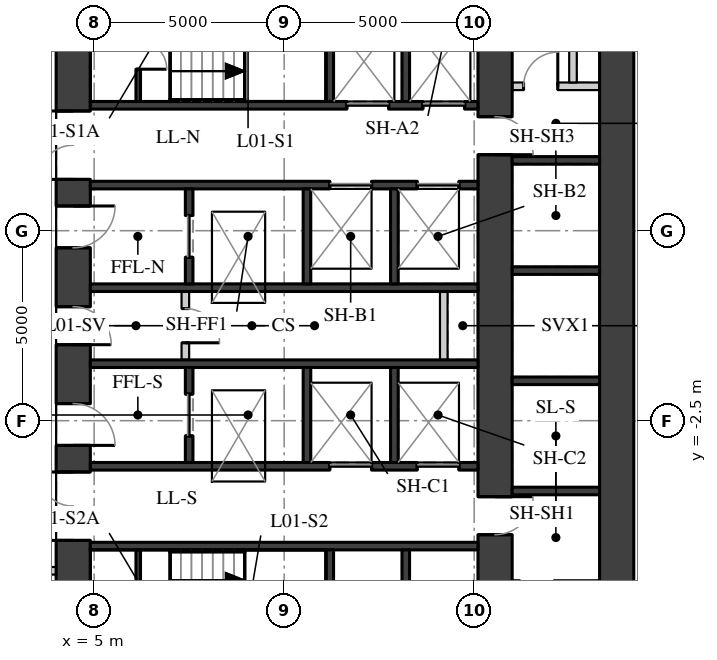
"""IFC4 building model, lengths in metres.
Left out: names, types, materials, properties, quantities, classifications, styles, units other than length and angle.
Written with IfcOpenShell. Run it as: python <this file> out.ifc"""

import sys

from ifc_helpers import new_model, si_unit, direction, frame, frame_2d, origin, place, context, subcontext, project, spatial, rectangle, extrude, element, fill, save


model = new_model("IFC4")
c1 = context("Model", 3, precision=1e-05, world=origin(), true_north=direction((0.0, 1.0)))
c2 = subcontext(c1, "Body", "Model", "MODEL_VIEW")
j1 = project(units=[si_unit("LENGTHUNIT", "METRE"), si_unit("PLANEANGLEUNIT", "RADIAN")], contexts=[c1])
p1 = place(None, origin())
s1 = spatial("IfcSite", under=j1, at=p1, CompositionType="ELEMENT")
p2 = place(p1, origin())
s2 = spatial("IfcBuilding", under=s1, at=p2, CompositionType="ELEMENT")
p3 = place(p2, frame((0.0, 0.0, 7.5)))
s3 = spatial("IfcBuildingStorey", under=s2, at=p3, CompositionType="ELEMENT", Elevation=7.5)
p4 = place(p3, frame((4.45, -11.1, 0.0), z_axis=(0.0, 0.0, 1.0), x_axis=(0.0, 1.0, 0.0)))
e1 = element("IfcWall", 1, at=p4, inside=s3, PredefinedType="SHEAR", context=c2, shape_type="SweptSolid", body=[
    extrude(rectangle(XDim=22.2, YDim=0.9, at=frame_2d((11.1, 0.0))), origin(), (0.0, 0.0, 1.0), 4.59),
])
p5 = place(p4, frame((2.35, 0.0, 0.0)))
e2 = element("IfcOpeningElement", 2, at=p5, cuts=e1, PredefinedType="OPENING", context=c2, shape_type="SweptSolid", body=[
    extrude(rectangle(XDim=1.5, YDim=2.1, at=frame_2d((0.75, 1.05))), frame((0.0, 0.46, 0.0), z_axis=(0.0, -1.0, 0.0), x_axis=(1.0, 0.0, 0.0)), (0.0, 0.0, 1.0), 0.92),
])
p6 = place(p4, frame((5.45, 0.0, 0.0)))
e3 = element("IfcOpeningElement", 3, at=p6, cuts=e1, PredefinedType="OPENING", context=c2, shape_type="SweptSolid", body=[
    extrude(rectangle(XDim=1.8, YDim=2.1, at=frame_2d((0.9, 1.05))), frame((0.0, 0.46, 0.0), z_axis=(0.0, -1.0, 0.0), x_axis=(1.0, 0.0, 0.0)), (0.0, 0.0, 1.0), 0.92),
])
p7 = place(p4, frame((7.95, 0.0, 0.0)))
e4 = element("IfcOpeningElement", 4, at=p7, cuts=e1, PredefinedType="OPENING", context=c2, shape_type="SweptSolid", body=[
    extrude(rectangle(XDim=1.1, YDim=2.1, at=frame_2d((0.55, 1.05))), frame((0.0, 0.46, 0.0), z_axis=(0.0, -1.0, 0.0), x_axis=(1.0, 0.0, 0.0)), (0.0, 0.0, 1.0), 0.92),
])
p8 = place(p4, frame((10.6, 0.0, 0.0)))
e5 = element("IfcOpeningElement", 5, at=p8, cuts=e1, PredefinedType="OPENING", context=c2, shape_type="SweptSolid", body=[
    extrude(rectangle(XDim=1.0, YDim=2.1, at=frame_2d((0.5, 1.05))), frame((0.0, 0.46, 0.0), z_axis=(0.0, -1.0, 0.0), x_axis=(1.0, 0.0, 0.0)), (0.0, 0.0, 1.0), 0.92),
])
p9 = place(p4, frame((13.15, 0.0, 0.0)))
e6 = element("IfcOpeningElement", 6, at=p9, cuts=e1, PredefinedType="OPENING", context=c2, shape_type="SweptSolid", body=[
    extrude(rectangle(XDim=1.1, YDim=2.1, at=frame_2d((0.55, 1.05))), frame((0.0, 0.46, 0.0), z_axis=(0.0, -1.0, 0.0), x_axis=(1.0, 0.0, 0.0)), (0.0, 0.0, 1.0), 0.92),
])
p10 = place(p4, frame((14.95, 0.0, 0.0)))
e7 = element("IfcOpeningElement", 7, at=p10, cuts=e1, PredefinedType="OPENING", context=c2, shape_type="SweptSolid", body=[
    extrude(rectangle(XDim=1.8, YDim=2.1, at=frame_2d((0.9, 1.05))), frame((0.0, 0.46, 0.0), z_axis=(0.0, -1.0, 0.0), x_axis=(1.0, 0.0, 0.0)), (0.0, 0.0, 1.0), 0.92),
])
p11 = place(p4, frame((18.35, 0.0, 0.0)))
e8 = element("IfcOpeningElement", 8, at=p11, cuts=e1, PredefinedType="OPENING", context=c2, shape_type="SweptSolid", body=[
    extrude(rectangle(XDim=1.5, YDim=2.1, at=frame_2d((0.75, 1.05))), frame((0.0, 0.46, 0.0), z_axis=(0.0, -1.0, 0.0), x_axis=(1.0, 0.0, 0.0)), (0.0, 0.0, 1.0), 0.92),
])
p12 = place(p3, frame((18.75, -11.1, 0.0), z_axis=(0.0, 0.0, 1.0), x_axis=(0.0, 1.0, 0.0)))
e9 = element("IfcWall", 9, at=p12, inside=s3, PredefinedType="SHEAR", context=c2, shape_type="SweptSolid", body=[
    extrude(rectangle(XDim=22.2, YDim=0.9, at=frame_2d((11.1, 0.0))), origin(), (0.0, 0.0, 1.0), 4.59),
])
p13 = place(p3, frame((15.55, -11.1, 0.0), z_axis=(0.0, 0.0, 1.0), x_axis=(0.0, 1.0, 0.0)))
e10 = element("IfcWall", 10, at=p13, inside=s3, PredefinedType="SHEAR", context=c2, shape_type="SweptSolid", body=[
    extrude(rectangle(XDim=22.2, YDim=0.9, at=frame_2d((11.1, 0.0))), origin(), (0.0, 0.0, 1.0), 4.59),
])
p14 = place(p13, frame((15.6, 0.0, 0.0)))
e11 = element("IfcOpeningElement", 11, at=p14, cuts=e10, PredefinedType="OPENING", context=c2, shape_type="SweptSolid", body=[
    extrude(rectangle(XDim=1.0, YDim=2.1, at=frame_2d((0.5, 1.05))), frame((0.0, 0.46, 0.0), z_axis=(0.0, -1.0, 0.0), x_axis=(1.0, 0.0, 0.0)), (0.0, 0.0, 1.0), 0.92),
])
p15 = place(p13, frame((5.6, 0.0, 0.0)))
e12 = element("IfcOpeningElement", 12, at=p15, cuts=e10, PredefinedType="OPENING", context=c2, shape_type="SweptSolid", body=[
    extrude(rectangle(XDim=1.0, YDim=2.1, at=frame_2d((0.5, 1.05))), frame((0.0, 0.46, 0.0), z_axis=(0.0, -1.0, 0.0), x_axis=(1.0, 0.0, 0.0)), (0.0, 0.0, 1.0), 0.92),
])
p16 = place(p3, frame((4.9, 5.8, 0.0), z_axis=(0.0, 0.0, 1.0), x_axis=(1.0, 0.0, 0.0)))
e13 = element("IfcWall", 13, at=p16, inside=s3, PredefinedType="SHEAR", context=c2, shape_type="SweptSolid", body=[
    extrude(rectangle(XDim=10.2, YDim=0.2, at=frame_2d((5.1, 0.0))), origin(), (0.0, 0.0, 1.0), 4.59),
])
p17 = place(p16, frame((6.75, 0.0, 0.0)))
e14 = element("IfcOpeningElement", 14, at=p17, cuts=e13, PredefinedType="OPENING", context=c2, shape_type="SweptSolid", body=[
    extrude(rectangle(XDim=1.1, YDim=2.1, at=frame_2d((0.55, 1.05))), frame((0.0, 0.11, 0.0), z_axis=(0.0, -1.0, 0.0), x_axis=(1.0, 0.0, 0.0)), (0.0, 0.0, 1.0), 0.22),
])
p18 = place(p16, frame((8.75, 0.0, 0.0)))
e15 = element("IfcOpeningElement", 15, at=p18, cuts=e13, PredefinedType="OPENING", context=c2, shape_type="SweptSolid", body=[
    extrude(rectangle(XDim=1.1, YDim=2.1, at=frame_2d((0.55, 1.05))), frame((0.0, 0.11, 0.0), z_axis=(0.0, -1.0, 0.0), x_axis=(1.0, 0.0, 0.0)), (0.0, 0.0, 1.0), 0.22),
])
p19 = place(p3, frame((4.9, 3.7, 0.0), z_axis=(0.0, 0.0, 1.0), x_axis=(1.0, 0.0, 0.0)))
e16 = element("IfcWall", 16, at=p19, inside=s3, PredefinedType="SHEAR", context=c2, shape_type="SweptSolid", body=[
    extrude(rectangle(XDim=10.2, YDim=0.2, at=frame_2d((5.1, 0.0))), origin(), (0.0, 0.0, 1.0), 4.59),
])
p20 = place(p19, frame((6.3, 0.0, 0.0)))
e17 = element("IfcOpeningElement", 17, at=p20, cuts=e16, PredefinedType="OPENING", context=c2, shape_type="SweptSolid", body=[
    extrude(rectangle(XDim=1.1, YDim=2.1, at=frame_2d((0.55, 1.05))), frame((0.0, 0.11, 0.0), z_axis=(0.0, -1.0, 0.0), x_axis=(1.0, 0.0, 0.0)), (0.0, 0.0, 1.0), 0.22),
])
p21 = place(p19, frame((8.6, 0.0, 0.0)))
e18 = element("IfcOpeningElement", 18, at=p21, cuts=e16, PredefinedType="OPENING", context=c2, shape_type="SweptSolid", body=[
    extrude(rectangle(XDim=1.1, YDim=2.1, at=frame_2d((0.55, 1.05))), frame((0.0, 0.11, 0.0), z_axis=(0.0, -1.0, 0.0), x_axis=(1.0, 0.0, 0.0)), (0.0, 0.0, 1.0), 0.22),
])
for number, where, z_axis, x_axis in (
    (19, (4.9, 1.0, 0.0), (0.0, 0.0, 1.0), (1.0, 0.0, 0.0)),
    (20, (4.9, -1.0, 0.0), (0.0, 0.0, 1.0), (1.0, 0.0, 0.0)),
):
    element("IfcWall", number, at=place(p3, frame(where, z_axis=z_axis, x_axis=x_axis)), inside=s3, PredefinedType="SHEAR", context=c2, shape_type="SweptSolid", body=[
        extrude(rectangle(XDim=10.2, YDim=0.2, at=frame_2d((5.1, 0.0))), origin(), (0.0, 0.0, 1.0), 4.59),
    ])
p22 = place(p3, frame((4.9, -3.7, 0.0), z_axis=(0.0, 0.0, 1.0), x_axis=(1.0, 0.0, 0.0)))
e21 = element("IfcWall", 21, at=p22, inside=s3, PredefinedType="SHEAR", context=c2, shape_type="SweptSolid", body=[
    extrude(rectangle(XDim=10.2, YDim=0.2, at=frame_2d((5.1, 0.0))), origin(), (0.0, 0.0, 1.0), 4.59),
])
p23 = place(p22, frame((6.3, 0.0, 0.0)))
e22 = element("IfcOpeningElement", 22, at=p23, cuts=e21, PredefinedType="OPENING", context=c2, shape_type="SweptSolid", body=[
    extrude(rectangle(XDim=1.1, YDim=2.1, at=frame_2d((0.55, 1.05))), frame((0.0, 0.11, 0.0), z_axis=(0.0, -1.0, 0.0), x_axis=(1.0, 0.0, 0.0)), (0.0, 0.0, 1.0), 0.22),
])
p24 = place(p22, frame((8.6, 0.0, 0.0)))
e23 = element("IfcOpeningElement", 23, at=p24, cuts=e21, PredefinedType="OPENING", context=c2, shape_type="SweptSolid", body=[
    extrude(rectangle(XDim=1.1, YDim=2.1, at=frame_2d((0.55, 1.05))), frame((0.0, 0.11, 0.0), z_axis=(0.0, -1.0, 0.0), x_axis=(1.0, 0.0, 0.0)), (0.0, 0.0, 1.0), 0.22),
])
p25 = place(p3, frame((4.9, -5.8, 0.0), z_axis=(0.0, 0.0, 1.0), x_axis=(1.0, 0.0, 0.0)))
e24 = element("IfcWall", 24, at=p25, inside=s3, PredefinedType="SHEAR", context=c2, shape_type="SweptSolid", body=[
    extrude(rectangle(XDim=10.2, YDim=0.2, at=frame_2d((5.1, 0.0))), origin(), (0.0, 0.0, 1.0), 4.59),
])
for number, where, z_axis, x_axis in (
    (25, (11.2, 5.9, 0.0), (0.0, 0.0, 1.0), (0.0, 1.0, 0.0)),
    (26, (11.2, -9.1, 0.0), (0.0, 0.0, 1.0), (0.0, 1.0, 0.0)),
    (27, (13.2, 5.9, 0.0), (0.0, 0.0, 1.0), (0.0, 1.0, 0.0)),
    (28, (13.2, -9.1, 0.0), (0.0, 0.0, 1.0), (0.0, 1.0, 0.0)),
):
    element("IfcWall", number, at=place(p3, frame(where, z_axis=z_axis, x_axis=x_axis)), inside=s3, PredefinedType="SHEAR", context=c2, shape_type="SweptSolid", body=[
        extrude(rectangle(XDim=3.2, YDim=0.2, at=frame_2d((1.6, 0.0))), origin(), (0.0, 0.0, 1.0), 4.59),
    ])
p26 = place(p3, frame((7.5, 1.1, 0.0), z_axis=(0.0, 0.0, 1.0), x_axis=(0.0, 1.0, 0.0)))
e29 = element("IfcWall", 29, at=p26, inside=s3, PredefinedType="SHEAR", context=c2, shape_type="SweptSolid", body=[
    extrude(rectangle(XDim=2.5, YDim=0.2, at=frame_2d((1.25, 0.0))), origin(), (0.0, 0.0, 1.0), 4.59),
])
p27 = place(p26, frame((0.7, 0.0, 0.0)))
e30 = element("IfcOpeningElement", 30, at=p27, cuts=e29, PredefinedType="OPENING", context=c2, shape_type="SweptSolid", body=[
    extrude(rectangle(XDim=1.1, YDim=2.1, at=frame_2d((0.55, 1.05))), frame((0.0, 0.11, 0.0), z_axis=(0.0, -1.0, 0.0), x_axis=(1.0, 0.0, 0.0)), (0.0, 0.0, 1.0), 0.22),
])
p28 = place(p3, frame((7.5, -3.6, 0.0), z_axis=(0.0, 0.0, 1.0), x_axis=(0.0, 1.0, 0.0)))
e31 = element("IfcWall", 31, at=p28, inside=s3, PredefinedType="SHEAR", context=c2, shape_type="SweptSolid", body=[
    extrude(rectangle(XDim=2.5, YDim=0.2, at=frame_2d((1.25, 0.0))), origin(), (0.0, 0.0, 1.0), 4.59),
])
p29 = place(p28, frame((0.7, 0.0, 0.0)))
e32 = element("IfcOpeningElement", 32, at=p29, cuts=e31, PredefinedType="OPENING", context=c2, shape_type="SweptSolid", body=[
    extrude(rectangle(XDim=1.1, YDim=2.1, at=frame_2d((0.55, 1.05))), frame((0.0, 0.11, 0.0), z_axis=(0.0, -1.0, 0.0), x_axis=(1.0, 0.0, 0.0)), (0.0, 0.0, 1.0), 0.22),
])
for number, where, z_axis, x_axis in (
    (33, (10.6, 1.1, 0.0), (0.0, 0.0, 1.0), (0.0, 1.0, 0.0)),
    (34, (10.6, -3.6, 0.0), (0.0, 0.0, 1.0), (0.0, 1.0, 0.0)),
    (35, (12.9, 1.1, 0.0), (0.0, 0.0, 1.0), (0.0, 1.0, 0.0)),
    (36, (12.9, -3.6, 0.0), (0.0, 0.0, 1.0), (0.0, 1.0, 0.0)),
):
    element("IfcWall", number, at=place(p3, frame(where, z_axis=z_axis, x_axis=x_axis)), inside=s3, PredefinedType="SHEAR", context=c2, shape_type="SweptSolid", body=[
        extrude(rectangle(XDim=2.5, YDim=0.2, at=frame_2d((1.25, 0.0))), origin(), (0.0, 0.0, 1.0), 4.59),
    ])
p30 = place(p3, frame((6.16, 5.9, 0.0), z_axis=(0.0, 0.0, 1.0), x_axis=(0.0, 1.0, 0.0)))
e37 = element("IfcWall", 37, at=p30, inside=s3, PredefinedType="SHEAR", context=c2, shape_type="SweptSolid", body=[
    extrude(rectangle(XDim=3.2, YDim=0.12, at=frame_2d((1.6, 0.0))), origin(), (0.0, 0.0, 1.0), 2.29),
])
p31 = place(p30, frame((0.85, 0.0, 0.0)))
e38 = element("IfcOpeningElement", 38, at=p31, cuts=e37, PredefinedType="OPENING", context=c2, shape_type="SweptSolid", body=[
    extrude(rectangle(XDim=1.5, YDim=2.1, at=frame_2d((0.75, 1.05))), frame((0.0, 0.07, 0.0), z_axis=(0.0, -1.0, 0.0), x_axis=(1.0, 0.0, 0.0)), (0.0, 0.0, 1.0), 0.14),
])
p32 = place(p3, frame((6.16, -9.1, 0.0), z_axis=(0.0, 0.0, 1.0), x_axis=(0.0, 1.0, 0.0)))
e39 = element("IfcWall", 39, at=p32, inside=s3, PredefinedType="SHEAR", context=c2, shape_type="SweptSolid", body=[
    extrude(rectangle(XDim=3.2, YDim=0.12, at=frame_2d((1.6, 0.0))), origin(), (0.0, 0.0, 1.0), 2.29),
])
p33 = place(p32, frame((0.85, 0.0, 0.0)))
e40 = element("IfcOpeningElement", 40, at=p33, cuts=e39, PredefinedType="OPENING", context=c2, shape_type="SweptSolid", body=[
    extrude(rectangle(XDim=1.5, YDim=2.1, at=frame_2d((0.75, 1.05))), frame((0.0, 0.07, 0.0), z_axis=(0.0, -1.0, 0.0), x_axis=(1.0, 0.0, 0.0)), (0.0, 0.0, 1.0), 0.14),
])
p34 = place(p3, frame((7.4, -0.9, 0.0), z_axis=(0.0, 0.0, 1.0), x_axis=(0.0, 1.0, 0.0)))
e41 = element("IfcWall", 41, at=p34, inside=s3, PredefinedType="PARTITIONING", context=c2, shape_type="SweptSolid", body=[
    extrude(rectangle(XDim=1.8, YDim=0.2, at=frame_2d((0.9, 0.0))), origin(), (0.0, 0.0, 1.0), 4.59),
])
p35 = place(p34, frame((0.45, 0.0, 0.0)))
e42 = element("IfcOpeningElement", 42, at=p35, cuts=e41, PredefinedType="OPENING", context=c2, shape_type="SweptSolid", body=[
    extrude(rectangle(XDim=0.9, YDim=2.1, at=frame_2d((0.45, 1.05))), frame((0.0, 0.11, 0.0), z_axis=(0.0, -1.0, 0.0), x_axis=(1.0, 0.0, 0.0)), (0.0, 0.0, 1.0), 0.22),
])
p36 = place(p3, frame((14.2, -0.9, 0.0), z_axis=(0.0, 0.0, 1.0), x_axis=(0.0, 1.0, 0.0)))
e43 = element("IfcWall", 43, at=p36, inside=s3, PredefinedType="PARTITIONING", context=c2, shape_type="SweptSolid", body=[
    extrude(rectangle(XDim=1.8, YDim=0.2, at=frame_2d((0.9, 0.0))), origin(), (0.0, 0.0, 1.0), 4.59),
])
for number, where, z_axis, x_axis in (
    (44, (16.0, -4.35, 0.0), (0.0, 0.0, 1.0), (1.0, 0.0, 0.0)),
    (45, (16.0, -1.45, 0.0), (0.0, 0.0, 1.0), (1.0, 0.0, 0.0)),
    (46, (16.0, 1.45, 0.0), (0.0, 0.0, 1.0), (1.0, 0.0, 0.0)),
    (47, (16.0, 4.35, 0.0), (0.0, 0.0, 1.0), (1.0, 0.0, 0.0)),
):
    element("IfcWall", number, at=place(p3, frame(where, z_axis=z_axis, x_axis=x_axis)), inside=s3, PredefinedType="SHEAR", context=c2, shape_type="SweptSolid", body=[
        extrude(rectangle(XDim=2.3, YDim=0.2, at=frame_2d((1.15, 0.0))), origin(), (0.0, 0.0, 1.0), 4.59),
    ])
p37 = place(p3, frame((16.0, 6.3, 0.0), z_axis=(0.0, 0.0, 1.0), x_axis=(1.0, 0.0, 0.0)))
e48 = element("IfcWall", 48, at=p37, inside=s3, PredefinedType="PARTITIONING", context=c2, shape_type="SweptSolid", body=[
    extrude(rectangle(XDim=2.3, YDim=0.2, at=frame_2d((1.15, 0.0))), origin(), (0.0, 0.0, 1.0), 4.59),
])
p38 = place(p37, frame((0.3, 0.0, 0.0)))
e49 = element("IfcOpeningElement", 49, at=p38, cuts=e48, PredefinedType="OPENING", context=c2, shape_type="SweptSolid", body=[
    extrude(rectangle(XDim=0.9, YDim=2.1, at=frame_2d((0.45, 1.05))), frame((0.0, 0.11, 0.0), z_axis=(0.0, -1.0, 0.0), x_axis=(1.0, 0.0, 0.0)), (0.0, 0.0, 1.0), 0.22),
])
p39 = place(p3, frame((17.6, 6.4, 0.0), z_axis=(0.0, 0.0, 1.0), x_axis=(0.0, 1.0, 0.0)))
e50 = element("IfcWall", 50, at=p39, inside=s3, PredefinedType="PARTITIONING", context=c2, shape_type="SweptSolid", body=[
    extrude(rectangle(XDim=4.7, YDim=0.2, at=frame_2d((2.35, 0.0))), origin(), (0.0, 0.0, 1.0), 4.59),
])
p40 = place(p3, frame((-14.4, -6.45, 0.0), z_axis=(0.0, 0.0, 1.0), x_axis=(1.0, 0.0, 0.0)))
e51 = element("IfcWall", 51, at=p40, inside=s3, PredefinedType="PARTITIONING", context=c2, shape_type="SweptSolid", body=[
    extrude(rectangle(XDim=18.402, YDim=0.2, at=frame_2d((9.201, 0.0))), origin(), (0.0, 0.0, 1.0), 4.59),
])
p41 = place(p40, frame((8.001, 0.0, 0.0)))
e52 = element("IfcOpeningElement", 52, at=p41, cuts=e51, PredefinedType="OPENING", context=c2, shape_type="SweptSolid", body=[
    extrude(rectangle(XDim=2.4, YDim=2.4, at=frame_2d((1.2, 1.2))), frame((0.0, 0.11, 0.0), z_axis=(0.0, -1.0, 0.0), x_axis=(1.0, 0.0, 0.0)), (0.0, 0.0, 1.0), 0.22),
])
p42 = place(p6, origin())
e53 = element("IfcDoor", 53, at=p42, inside=s3, OperationType="DOUBLE_DOOR_SINGLE_SWING", PredefinedType="DOOR", context=c2, shape_type="SweptSolid", body=[
    extrude(rectangle(XDim=1.8, YDim=2.1, at=frame_2d((0.9, 1.05))), frame((0.0, 0.025, 0.0), z_axis=(0.0, -1.0, 0.0), x_axis=(1.0, 0.0, 0.0)), (0.0, 0.0, 1.0), 0.05),
])
fill(e3, e53)
p43 = place(p7, origin())
e54 = element("IfcDoor", 54, at=p43, inside=s3, OperationType="SINGLE_SWING_RIGHT", PredefinedType="DOOR", context=c2, shape_type="SweptSolid", body=[
    extrude(rectangle(XDim=1.1, YDim=2.1, at=frame_2d((0.55, 1.05))), frame((0.0, 0.025, 0.0), z_axis=(0.0, -1.0, 0.0), x_axis=(1.0, 0.0, 0.0)), (0.0, 0.0, 1.0), 0.05),
])
fill(e4, e54)
p44 = place(p8, origin())
e55 = element("IfcDoor", 55, at=p44, inside=s3, OperationType="SINGLE_SWING_RIGHT", PredefinedType="DOOR", context=c2, shape_type="SweptSolid", body=[
    extrude(rectangle(XDim=1.0, YDim=2.1, at=frame_2d((0.5, 1.05))), frame((0.0, 0.025, 0.0), z_axis=(0.0, -1.0, 0.0), x_axis=(1.0, 0.0, 0.0)), (0.0, 0.0, 1.0), 0.05),
])
fill(e5, e55)
p45 = place(p9, origin())
e56 = element("IfcDoor", 56, at=p45, inside=s3, OperationType="SINGLE_SWING_LEFT", PredefinedType="DOOR", context=c2, shape_type="SweptSolid", body=[
    extrude(rectangle(XDim=1.1, YDim=2.1, at=frame_2d((0.55, 1.05))), frame((0.0, 0.025, 0.0), z_axis=(0.0, -1.0, 0.0), x_axis=(1.0, 0.0, 0.0)), (0.0, 0.0, 1.0), 0.05),
])
fill(e6, e56)
p46 = place(p10, origin())
e57 = element("IfcDoor", 57, at=p46, inside=s3, OperationType="DOUBLE_DOOR_SINGLE_SWING", PredefinedType="DOOR", context=c2, shape_type="SweptSolid", body=[
    extrude(rectangle(XDim=1.8, YDim=2.1, at=frame_2d((0.9, 1.05))), frame((0.0, 0.025, 0.0), z_axis=(0.0, -1.0, 0.0), x_axis=(1.0, 0.0, 0.0)), (0.0, 0.0, 1.0), 0.05),
])
fill(e7, e57)
p47 = place(p31, origin())
e58 = element("IfcDoor", 58, at=p47, inside=s3, OperationType="DOUBLE_DOOR_SINGLE_SWING", PredefinedType="DOOR", context=c2, shape_type="SweptSolid", body=[
    extrude(rectangle(XDim=1.5, YDim=2.1, at=frame_2d((0.75, 1.05))), frame((0.0, 0.025, 0.0), z_axis=(0.0, -1.0, 0.0), x_axis=(1.0, 0.0, 0.0)), (0.0, 0.0, 1.0), 0.05),
])
fill(e38, e58)
p48 = place(p17, origin())
e59 = element("IfcDoor", 59, at=p48, inside=s3, OperationType="DOUBLE_DOOR_SLIDING", PredefinedType="DOOR", context=c2, shape_type="SweptSolid", body=[
    extrude(rectangle(XDim=1.1, YDim=2.1, at=frame_2d((0.55, 1.05))), frame((0.0, 0.025, 0.0), z_axis=(0.0, -1.0, 0.0), x_axis=(1.0, 0.0, 0.0)), (0.0, 0.0, 1.0), 0.05),
])
fill(e14, e59)
p49 = place(p18, origin())
e60 = element("IfcDoor", 60, at=p49, inside=s3, OperationType="DOUBLE_DOOR_SLIDING", PredefinedType="DOOR", context=c2, shape_type="SweptSolid", body=[
    extrude(rectangle(XDim=1.1, YDim=2.1, at=frame_2d((0.55, 1.05))), frame((0.0, 0.025, 0.0), z_axis=(0.0, -1.0, 0.0), x_axis=(1.0, 0.0, 0.0)), (0.0, 0.0, 1.0), 0.05),
])
fill(e15, e60)
p50 = place(p20, origin())
e61 = element("IfcDoor", 61, at=p50, inside=s3, OperationType="DOUBLE_DOOR_SLIDING", PredefinedType="DOOR", context=c2, shape_type="SweptSolid", body=[
    extrude(rectangle(XDim=1.1, YDim=2.1, at=frame_2d((0.55, 1.05))), frame((0.0, 0.025, 0.0), z_axis=(0.0, -1.0, 0.0), x_axis=(1.0, 0.0, 0.0)), (0.0, 0.0, 1.0), 0.05),
])
fill(e17, e61)
p51 = place(p21, origin())
e62 = element("IfcDoor", 62, at=p51, inside=s3, OperationType="DOUBLE_DOOR_SLIDING", PredefinedType="DOOR", context=c2, shape_type="SweptSolid", body=[
    extrude(rectangle(XDim=1.1, YDim=2.1, at=frame_2d((0.55, 1.05))), frame((0.0, 0.025, 0.0), z_axis=(0.0, -1.0, 0.0), x_axis=(1.0, 0.0, 0.0)), (0.0, 0.0, 1.0), 0.05),
])
fill(e18, e62)
p52 = place(p23, origin())
e63 = element("IfcDoor", 63, at=p52, inside=s3, OperationType="DOUBLE_DOOR_SLIDING", PredefinedType="DOOR", context=c2, shape_type="SweptSolid", body=[
    extrude(rectangle(XDim=1.1, YDim=2.1, at=frame_2d((0.55, 1.05))), frame((0.0, 0.025, 0.0), z_axis=(0.0, -1.0, 0.0), x_axis=(1.0, 0.0, 0.0)), (0.0, 0.0, 1.0), 0.05),
])
fill(e22, e63)
p53 = place(p24, origin())
e64 = element("IfcDoor", 64, at=p53, inside=s3, OperationType="DOUBLE_DOOR_SLIDING", PredefinedType="DOOR", context=c2, shape_type="SweptSolid", body=[
    extrude(rectangle(XDim=1.1, YDim=2.1, at=frame_2d((0.55, 1.05))), frame((0.0, 0.025, 0.0), z_axis=(0.0, -1.0, 0.0), x_axis=(1.0, 0.0, 0.0)), (0.0, 0.0, 1.0), 0.05),
])
fill(e23, e64)
p54 = place(p27, origin())
e65 = element("IfcDoor", 65, at=p54, inside=s3, OperationType="DOUBLE_DOOR_SLIDING", PredefinedType="DOOR", context=c2, shape_type="SweptSolid", body=[
    extrude(rectangle(XDim=1.1, YDim=2.1, at=frame_2d((0.55, 1.05))), frame((0.0, 0.025, 0.0), z_axis=(0.0, -1.0, 0.0), x_axis=(1.0, 0.0, 0.0)), (0.0, 0.0, 1.0), 0.05),
])
fill(e30, e65)
p55 = place(p29, origin())
e66 = element("IfcDoor", 66, at=p55, inside=s3, OperationType="DOUBLE_DOOR_SLIDING", PredefinedType="DOOR", context=c2, shape_type="SweptSolid", body=[
    extrude(rectangle(XDim=1.1, YDim=2.1, at=frame_2d((0.55, 1.05))), frame((0.0, 0.025, 0.0), z_axis=(0.0, -1.0, 0.0), x_axis=(1.0, 0.0, 0.0)), (0.0, 0.0, 1.0), 0.05),
])
fill(e32, e66)
p56 = place(p35, origin())
e67 = element("IfcDoor", 67, at=p56, inside=s3, OperationType="SINGLE_SWING_RIGHT", PredefinedType="DOOR", context=c2, shape_type="SweptSolid", body=[
    extrude(rectangle(XDim=0.9, YDim=2.1, at=frame_2d((0.45, 1.05))), frame((0.0, 0.025, 0.0), z_axis=(0.0, -1.0, 0.0), x_axis=(1.0, 0.0, 0.0)), (0.0, 0.0, 1.0), 0.05),
])
fill(e42, e67)
p57 = place(p14, origin())
e68 = element("IfcDoor", 68, at=p57, inside=s3, OperationType="SINGLE_SWING_RIGHT", PredefinedType="DOOR", context=c2, shape_type="SweptSolid", body=[
    extrude(rectangle(XDim=1.0, YDim=2.1, at=frame_2d((0.5, 1.05))), frame((0.0, 0.025, 0.0), z_axis=(0.0, -1.0, 0.0), x_axis=(1.0, 0.0, 0.0)), (0.0, 0.0, 1.0), 0.05),
])
fill(e11, e68)
p58 = place(p38, origin())
e69 = element("IfcDoor", 69, at=p58, inside=s3, OperationType="SINGLE_SWING_RIGHT", PredefinedType="DOOR", context=c2, shape_type="SweptSolid", body=[
    extrude(rectangle(XDim=0.9, YDim=2.1, at=frame_2d((0.45, 1.05))), frame((0.0, 0.025, 0.0), z_axis=(0.0, -1.0, 0.0), x_axis=(1.0, 0.0, 0.0)), (0.0, 0.0, 1.0), 0.05),
])
fill(e49, e69)
p59 = place(p15, origin())
e70 = element("IfcDoor", 70, at=p59, inside=s3, OperationType="SINGLE_SWING_LEFT", PredefinedType="DOOR", context=c2, shape_type="SweptSolid", body=[
    extrude(rectangle(XDim=1.0, YDim=2.1, at=frame_2d((0.5, 1.05))), frame((0.0, 0.025, 0.0), z_axis=(0.0, -1.0, 0.0), x_axis=(1.0, 0.0, 0.0)), (0.0, 0.0, 1.0), 0.05),
])
fill(e12, e70)
save(model, sys.argv[1])
